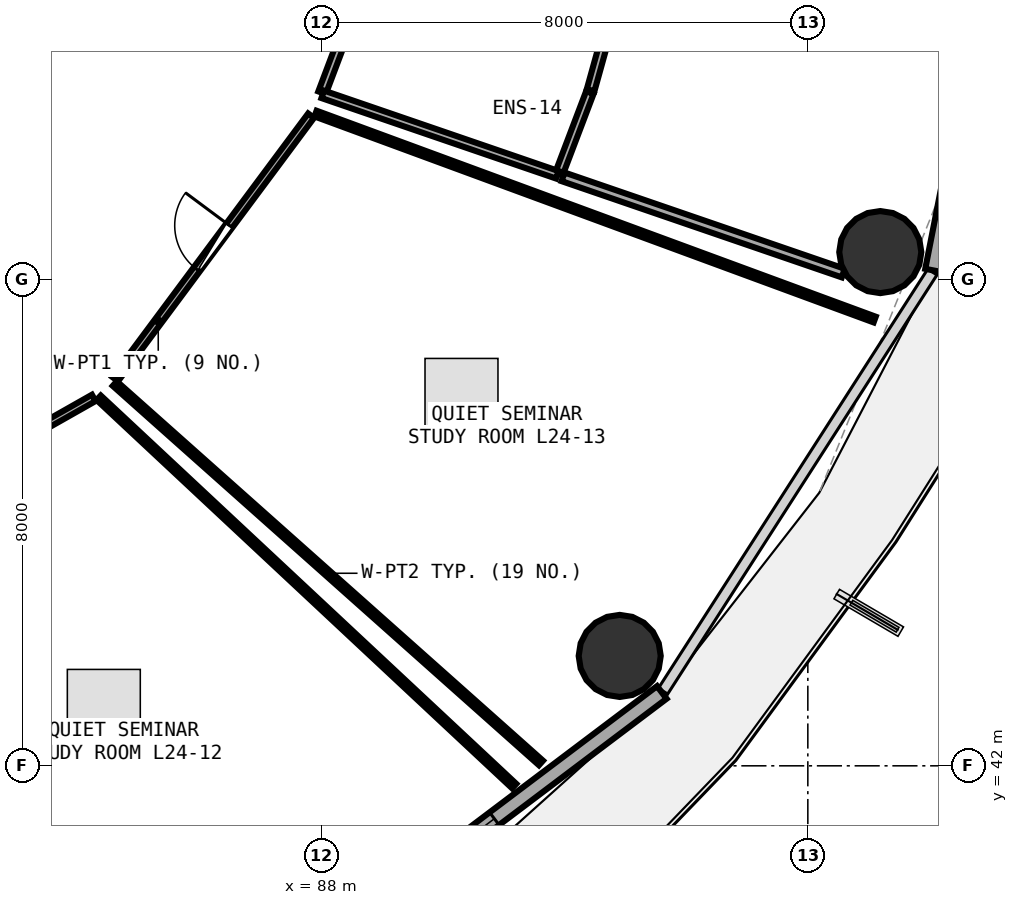
"""IFC4 building model, lengths in metres.
Left out: names, types, materials, properties, quantities, classifications, styles, units other than length and angle.
Written with IfcOpenShell. Run it as: python <this file> out.ifc"""

import sys

from ifc_helpers import new_model, si_unit, direction, frame, frame_2d, origin, origin_2d, place, context, subcontext, project, spatial, rectangle, circle, extrude, element, fill, save


model = new_model("IFC4")
c1 = context("Model", 3, precision=1e-05, world=origin(), true_north=direction((0.0, 1.0)))
c2 = subcontext(c1, "Body", "Model", "MODEL_VIEW")
j1 = project(units=[si_unit("LENGTHUNIT", "METRE"), si_unit("PLANEANGLEUNIT", "RADIAN")], contexts=[c1])
p1 = place(None, origin())
s1 = spatial("IfcSite", under=j1, at=p1, CompositionType="ELEMENT")
p2 = place(p1, origin())
s2 = spatial("IfcBuilding", under=s1, at=p2, CompositionType="ELEMENT")
p3 = place(p2, frame((0.0, 0.0, 95.1)))
s3 = spatial("IfcBuildingStorey", under=s2, at=p3, CompositionType="ELEMENT", Elevation=95.1)
for number, where, z_axis, x_axis in (
    (1, (92.906, 43.807, 0.0), (0.0, 0.0, 1.0), (1.0, 0.0, 0.0)),
    (2, (97.192, 50.448, 0.0), (0.0, 0.0, 1.0), (1.0, 0.0, 0.0)),
):
    element("IfcColumn", number, at=place(p3, frame(where, z_axis=z_axis, x_axis=x_axis)), inside=s3, PredefinedType="COLUMN", context=c2, shape_type="SweptSolid", body=[
        extrude(circle(Radius=0.675, at=origin_2d()), origin(), (0.0, 0.0, 1.0), 3.75),
    ])
p4 = place(p3, frame((86.812, 38.09, 0.0), z_axis=(0.0, 0.0, 1.0), x_axis=(0.798501507879, 0.601992808857, 0.0)))
e3 = element("IfcWall", 3, at=p4, inside=s3, PredefinedType="SOLIDWALL", context=c2, shape_type="SweptSolid", body=[
    extrude(rectangle(XDim=8.499, YDim=0.26, at=frame_2d((4.25, 0.0))), origin(), (0.0, 0.0, 1.0), 3.475),
])
p5 = place(p4, frame((3.45, 0.0, 0.85)))
e4 = element("IfcOpeningElement", 4, at=p5, cuts=e3, PredefinedType="OPENING", context=c2, shape_type="SweptSolid", body=[
    extrude(rectangle(XDim=1.6, YDim=1.45, at=frame_2d((0.8, 0.725))), frame((0.0, 0.14, 0.0), z_axis=(0.0, -1.0, 0.0), x_axis=(1.0, 0.0, 0.0)), (0.0, 0.0, 1.0), 0.28),
])
p6 = place(p3, frame((98.059, 50.148, 0.0), z_axis=(0.0, 0.0, 1.0), x_axis=(0.192581843632, 0.981280914674, 0.0)))
e5 = element("IfcWall", 5, at=p6, inside=s3, PredefinedType="SOLIDWALL", context=c2, shape_type="SweptSolid", body=[
    extrude(rectangle(XDim=7.987, YDim=0.26, at=frame_2d((3.993, 0.0))), origin(), (0.0, 0.0, 1.0), 3.475),
])
p7 = place(p6, frame((3.193, 0.0, 0.85)))
e6 = element("IfcOpeningElement", 6, at=p7, cuts=e5, PredefinedType="OPENING", context=c2, shape_type="SweptSolid", body=[
    extrude(rectangle(XDim=1.6, YDim=1.45, at=frame_2d((0.8, 0.725))), frame((0.0, 0.14, 0.0), z_axis=(0.0, -1.0, 0.0), x_axis=(1.0, 0.0, 0.0)), (0.0, 0.0, 1.0), 0.28),
])
p8 = place(p3, frame((79.365, 45.28, 0.0), z_axis=(0.0, 0.0, 1.0), x_axis=(0.870068136537, 0.49293147372, 0.0)))
e7 = element("IfcWall", 7, at=p8, inside=s3, PredefinedType="PARTITIONING", context=c2, shape_type="SweptSolid", body=[
    extrude(rectangle(XDim=5.621, YDim=0.12, at=frame_2d((2.811, 0.0))), origin(), (0.0, 0.0, 1.0), 2.925),
])
p9 = place(p8, frame((2.36, 0.0, 0.0)))
e8 = element("IfcOpeningElement", 8, at=p9, cuts=e7, PredefinedType="OPENING", context=c2, shape_type="SweptSolid", body=[
    extrude(rectangle(XDim=0.9, YDim=2.08, at=frame_2d((0.45, 1.04))), frame((0.0, 0.07, 0.0), z_axis=(0.0, -1.0, 0.0), x_axis=(1.0, 0.0, 0.0)), (0.0, 0.0, 1.0), 0.14),
])
p10 = place(p3, frame((84.608, 48.36, 0.0), z_axis=(0.0, 0.0, 1.0), x_axis=(0.596833425992, 0.802365167251, 0.0)))
e9 = element("IfcWall", 9, at=p10, inside=s3, PredefinedType="PARTITIONING", context=c2, shape_type="SweptSolid", body=[
    extrude(rectangle(XDim=5.399, YDim=0.12, at=frame_2d((2.699, 0.0))), origin(), (0.0, 0.0, 1.0), 2.925),
])
p11 = place(p10, frame((2.249, 0.0, 0.0)))
e10 = element("IfcOpeningElement", 10, at=p11, cuts=e9, PredefinedType="OPENING", context=c2, shape_type="SweptSolid", body=[
    extrude(rectangle(XDim=0.9, YDim=2.08, at=frame_2d((0.45, 1.04))), frame((0.0, 0.07, 0.0), z_axis=(0.0, -1.0, 0.0), x_axis=(1.0, 0.0, 0.0)), (0.0, 0.0, 1.0), 0.14),
])
p12 = place(p3, frame((84.337, 48.053, 0.0), z_axis=(0.0, 0.0, 1.0), x_axis=(0.730663657097, -0.682737592489, 0.0)))
e11 = element("IfcWall", 11, at=p12, inside=s3, PredefinedType="PARTITIONING", context=c2, shape_type="SweptSolid", body=[
    extrude(rectangle(XDim=9.353, YDim=0.1, at=frame_2d((4.676, 0.0))), origin(), (0.0, 0.0, 1.0), 2.975),
])
p13 = place(p3, frame((87.904, 52.726, 0.0), z_axis=(0.0, 0.0, 1.0), x_axis=(0.938361829853, -0.345654562063, 0.0)))
e12 = element("IfcWall", 12, at=p13, inside=s3, PredefinedType="PARTITIONING", context=c2, shape_type="SweptSolid", body=[
    extrude(rectangle(XDim=9.8, YDim=0.1, at=frame_2d((4.9, 0.0))), origin(), (0.0, 0.0, 1.0), 2.925),
])
p14 = place(p3, frame((91.611, 42.048, 0.0), z_axis=(0.0, 0.0, 1.0), x_axis=(-0.747021589751, 0.664799777713, 0.0)))
e13 = element("IfcWall", 13, at=p14, inside=s3, PredefinedType="PARTITIONING", context=c2, shape_type="SweptSolid", body=[
    extrude(rectangle(XDim=9.383, YDim=0.1, at=frame_2d((4.691, 0.0))), origin(), (0.0, 0.0, 1.0), 2.975),
])
p15 = place(p3, frame((88.01, 53.068, 0.0), z_axis=(0.0, 0.0, 1.0), x_axis=(0.353582849957, 0.93540321157, 0.0)))
e14 = element("IfcWall", 14, at=p15, inside=s3, PredefinedType="PLUMBINGWALL", context=c2, shape_type="SweptSolid", body=[
    extrude(rectangle(XDim=1.12, YDim=0.13, at=frame_2d((0.56, 0.0))), origin(), (0.0, 0.0, 1.0), 3.235),
])
p16 = place(p3, frame((92.81, 54.484, 0.0), z_axis=(0.0, 0.0, 1.0), x_axis=(-0.268041350083, -0.963407408445, 0.0)))
e15 = element("IfcWall", 15, at=p16, inside=s3, PredefinedType="PLUMBINGWALL", context=c2, shape_type="SweptSolid", body=[
    extrude(rectangle(XDim=1.426, YDim=0.13, at=frame_2d((0.713, 0.0))), origin(), (0.0, 0.0, 1.0), 3.48),
])
p17 = place(p3, frame((92.415, 53.072, 0.0), z_axis=(0.0, 0.0, 1.0), x_axis=(-0.354833873896, -0.934929367351, 0.0)))
e16 = element("IfcWall", 16, at=p17, inside=s3, PredefinedType="PLUMBINGWALL", context=c2, shape_type="SweptSolid", body=[
    extrude(rectangle(XDim=1.434, YDim=0.13, at=frame_2d((0.717, 0.0))), origin(), (0.0, 0.0, 1.0), 3.48),
])
p18 = place(p3, frame((91.88, 51.719, 0.0), z_axis=(0.0, 0.0, 1.0), x_axis=(-0.945930729077, 0.324368703466, 0.0)))
e17 = element("IfcWall", 17, at=p18, inside=s3, PredefinedType="PLUMBINGWALL", context=c2, shape_type="SweptSolid", body=[
    extrude(rectangle(XDim=4.079, YDim=0.13, at=frame_2d((2.039, 0.0))), origin(), (0.0, 0.0, 1.0), 3.175),
])
p19 = place(p3, frame((96.583, 50.104, 0.0), z_axis=(0.0, 0.0, 1.0), x_axis=(-0.945793886269, 0.324767493288, 0.0)))
e18 = element("IfcWall", 18, at=p19, inside=s3, PredefinedType="PARTITIONING", context=c2, shape_type="SweptSolid", body=[
    extrude(rectangle(XDim=4.873, YDim=0.15, at=frame_2d((2.437, 0.0))), origin(), (0.0, 0.0, 1.0), 2.925),
])
p20 = place(p5, origin())
e19 = element("IfcWindow", 19, at=p20, inside=s3, PartitioningType="SINGLE_PANEL", PredefinedType="WINDOW", context=c2, shape_type="SweptSolid", body=[
    extrude(rectangle(XDim=1.6, YDim=1.45, at=frame_2d((0.8, 0.725))), frame((0.0, 0.03, 0.0), z_axis=(0.0, -1.0, 0.0), x_axis=(1.0, 0.0, 0.0)), (0.0, 0.0, 1.0), 0.06),
])
fill(e4, e19)
p21 = place(p11, origin())
e20 = element("IfcDoor", 20, at=p21, inside=s3, OperationType="SINGLE_SWING_RIGHT", PredefinedType="DOOR", context=c2, shape_type="SweptSolid", body=[
    extrude(rectangle(XDim=0.9, YDim=2.08, at=frame_2d((0.45, 1.04))), frame((0.0, 0.025, 0.0), z_axis=(0.0, -1.0, 0.0), x_axis=(1.0, 0.0, 0.0)), (0.0, 0.0, 1.0), 0.05),
])
fill(e10, e20)
save(model, sys.argv[1])
